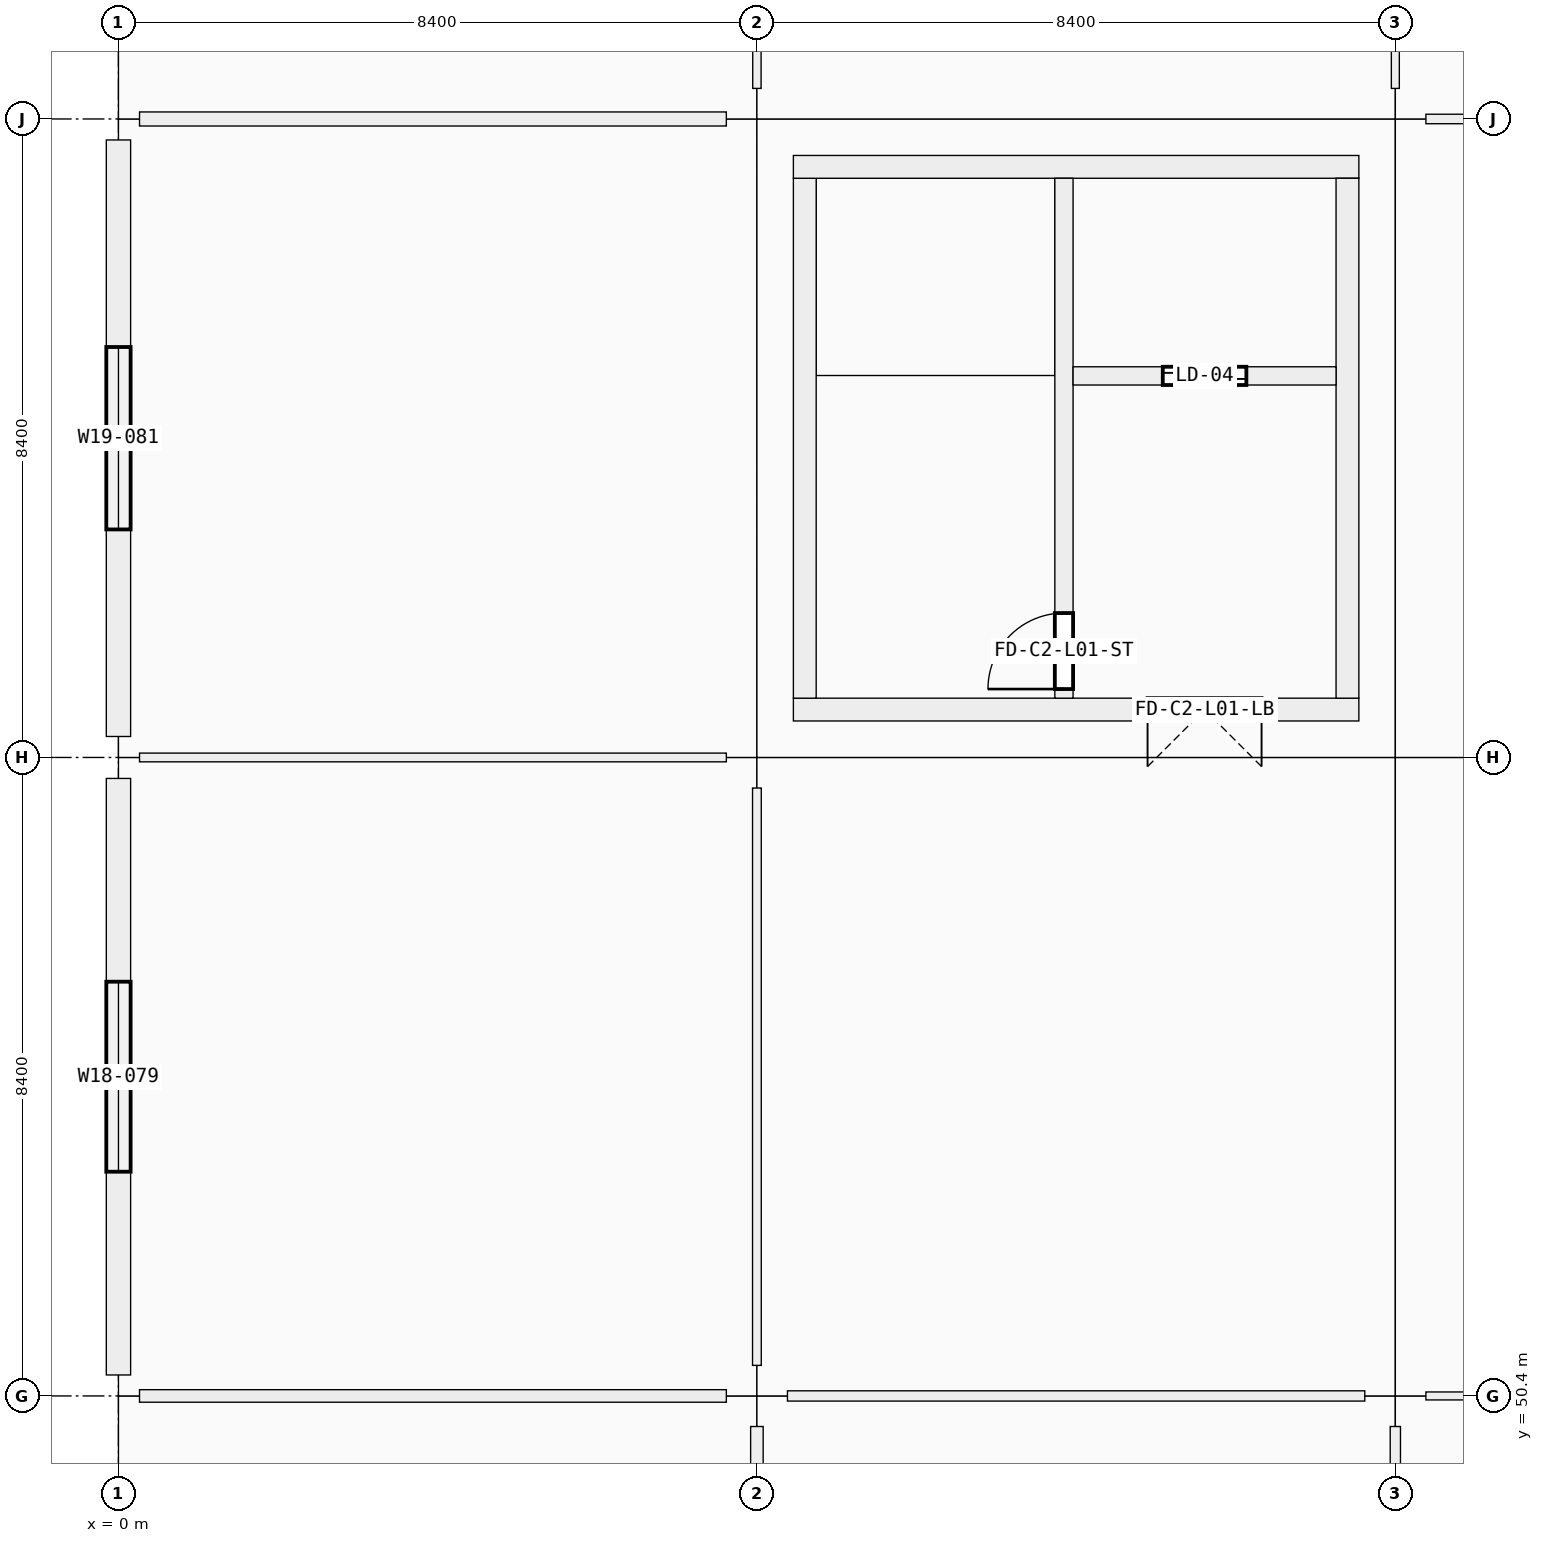
"""IFC4 building model, lengths in metres.
Left out: names, types, materials, properties, quantities, classifications, styles, units other than length and angle.
Written with IfcOpenShell. Run it as: python <this file> out.ifc"""

import sys

from ifc_helpers import new_model, si_unit, direction, frame, frame_2d, origin, origin_2d, place, context, subcontext, project, spatial, rectangle, extrude, element, fill, save


model = new_model("IFC4")
c1 = context("Model", 3, precision=1e-05, world=origin(), true_north=direction((0.0, 1.0)))
c2 = subcontext(c1, "Body", "Model", "MODEL_VIEW")
j1 = project(units=[si_unit("LENGTHUNIT", "METRE"), si_unit("PLANEANGLEUNIT", "RADIAN")], contexts=[c1])
p1 = place(None, origin())
s1 = spatial("IfcSite", under=j1, at=p1, CompositionType="ELEMENT")
p2 = place(p1, origin())
s2 = spatial("IfcBuilding", under=s1, at=p2, CompositionType="ELEMENT")
p3 = place(p2, frame((0.0, 0.0, 5.76)))
s3 = spatial("IfcBuildingStorey", under=s2, at=p3, CompositionType="ELEMENT", Elevation=5.76)
for number, where, z_axis, x_axis in (
    (1, (0.0, 50.4, 0.0), (0.0, 0.0, 1.0), (1.0, 0.0, 0.0)),
    (2, (0.0, 58.8, 0.0), (0.0, 0.0, 1.0), (1.0, 0.0, 0.0)),
    (3, (0.0, 67.2, 0.0), (0.0, 0.0, 1.0), (1.0, 0.0, 0.0)),
):
    element("IfcColumn", number, at=place(p3, frame(where, z_axis=z_axis, x_axis=x_axis)), inside=s3, PredefinedType="COLUMN", context=c2, shape_type="SweptSolid", body=[
        extrude(rectangle(XDim=0.55, YDim=0.55, at=origin_2d()), origin(), (0.0, 0.0, 1.0), 4.2),
    ])
for number, where, z_axis, x_axis in (
    (4, (8.4, 50.4, 0.0), (0.0, 0.0, 1.0), (1.0, 0.0, 0.0)),
    (5, (8.4, 58.8, 0.0), (0.0, 0.0, 1.0), (1.0, 0.0, 0.0)),
    (6, (8.4, 67.2, 0.0), (0.0, 0.0, 1.0), (1.0, 0.0, 0.0)),
    (7, (16.8, 50.4, 0.0), (0.0, 0.0, 1.0), (1.0, 0.0, 0.0)),
    (8, (16.8, 58.8, 0.0), (0.0, 0.0, 1.0), (1.0, 0.0, 0.0)),
    (9, (16.8, 67.2, 0.0), (0.0, 0.0, 1.0), (1.0, 0.0, 0.0)),
):
    element("IfcColumn", number, at=place(p3, frame(where, z_axis=z_axis, x_axis=x_axis)), inside=s3, PredefinedType="COLUMN", context=c2, shape_type="SweptSolid", body=[
        extrude(rectangle(XDim=0.8, YDim=0.8, at=origin_2d()), origin(), (0.0, 0.0, 1.0), 4.5),
    ])
p4 = place(p3, frame((0.0, 50.676, 0.0), z_axis=(0.0, 0.0, 1.0), x_axis=(0.0, 1.0, 0.0)))
e10 = element("IfcWall", 10, at=p4, inside=s3, PredefinedType="SOLIDWALL", context=c2, shape_type="SweptSolid", body=[
    extrude(rectangle(XDim=7.848, YDim=0.32, at=frame_2d((3.924, 0.0))), origin(), (0.0, 0.0, 1.0), 3.4),
])
p5 = place(p4, frame((2.674, 0.0, 0.9)))
e11 = element("IfcOpeningElement", 11, at=p5, cuts=e10, PredefinedType="OPENING", context=c2, shape_type="SweptSolid", body=[
    extrude(rectangle(XDim=2.5, YDim=1.65, at=frame_2d((1.25, 0.825))), frame((0.0, 0.16, 0.0), z_axis=(0.0, -1.0, 0.0), x_axis=(1.0, 0.0, 0.0)), (0.0, 0.0, 1.0), 0.32),
])
p6 = place(p3, frame((0.0, 59.076, 0.0), z_axis=(0.0, 0.0, 1.0), x_axis=(0.0, 1.0, 0.0)))
e12 = element("IfcWall", 12, at=p6, inside=s3, PredefinedType="SOLIDWALL", context=c2, shape_type="SweptSolid", body=[
    extrude(rectangle(XDim=7.848, YDim=0.32, at=frame_2d((3.924, 0.0))), origin(), (0.0, 0.0, 1.0), 3.4),
])
p7 = place(p6, frame((2.724, 0.0, 0.9)))
e13 = element("IfcOpeningElement", 13, at=p7, cuts=e12, PredefinedType="OPENING", context=c2, shape_type="SweptSolid", body=[
    extrude(rectangle(XDim=2.4, YDim=2.25, at=frame_2d((1.2, 1.125))), frame((0.0, 0.16, 0.0), z_axis=(0.0, -1.0, 0.0), x_axis=(1.0, 0.0, 0.0)), (0.0, 0.0, 1.0), 0.32),
])
p8 = place(p3, frame((16.32, 59.43, 0.0), z_axis=(0.0, 0.0, 1.0), x_axis=(-1.0, 0.0, 0.0)))
e14 = element("IfcWall", 14, at=p8, inside=s3, PredefinedType="SHEAR", context=c2, shape_type="SweptSolid", body=[
    extrude(rectangle(XDim=7.44, YDim=0.3, at=frame_2d((3.72, 0.0))), origin(), (0.0, 0.0, 1.0), 4.5),
])
p9 = place(p8, frame((1.28, 0.0, 0.0)))
e15 = element("IfcOpeningElement", 15, at=p9, cuts=e14, PredefinedType="OPENING", context=c2, shape_type="SweptSolid", body=[
    extrude(rectangle(XDim=1.5, YDim=2.15, at=frame_2d((0.75, 1.075))), frame((0.0, 0.15, 0.0), z_axis=(0.0, -1.0, 0.0), x_axis=(1.0, 0.0, 0.0)), (0.0, 0.0, 1.0), 0.3),
])
p10 = place(p3, frame((9.03, 59.58, 0.0), z_axis=(0.0, 0.0, 1.0), x_axis=(0.0, 1.0, 0.0)))
e16 = element("IfcWall", 16, at=p10, inside=s3, PredefinedType="SHEAR", context=c2, shape_type="SweptSolid", body=[
    extrude(rectangle(XDim=6.84, YDim=0.3, at=frame_2d((3.42, 0.0))), origin(), (0.0, 0.0, 1.0), 4.5),
])
p11 = place(p3, frame((8.88, 66.57, 0.0), z_axis=(0.0, 0.0, 1.0), x_axis=(1.0, 0.0, 0.0)))
e17 = element("IfcWall", 17, at=p11, inside=s3, PredefinedType="SHEAR", context=c2, shape_type="SweptSolid", body=[
    extrude(rectangle(XDim=7.44, YDim=0.3, at=frame_2d((3.72, 0.0))), origin(), (0.0, 0.0, 1.0), 4.5),
])
p12 = place(p3, frame((16.17, 66.42, 0.0), z_axis=(0.0, 0.0, 1.0), x_axis=(0.0, -1.0, 0.0)))
e18 = element("IfcWall", 18, at=p12, inside=s3, PredefinedType="SHEAR", context=c2, shape_type="SweptSolid", body=[
    extrude(rectangle(XDim=6.84, YDim=0.3, at=frame_2d((3.42, 0.0))), origin(), (0.0, 0.0, 1.0), 4.5),
])
p13 = place(p3, frame((12.44, 59.58, 0.0), z_axis=(0.0, 0.0, 1.0), x_axis=(0.0, 1.0, 0.0)))
e19 = element("IfcWall", 19, at=p13, inside=s3, PredefinedType="SHEAR", context=c2, shape_type="SweptSolid", body=[
    extrude(rectangle(XDim=6.84, YDim=0.24, at=frame_2d((3.42, 0.0))), origin(), (0.0, 0.0, 1.0), 4.5),
])
p14 = place(p13, frame((0.12, 0.0, 0.0)))
e20 = element("IfcOpeningElement", 20, at=p14, cuts=e19, PredefinedType="OPENING", context=c2, shape_type="SweptSolid", body=[
    extrude(rectangle(XDim=1.0, YDim=2.15, at=frame_2d((0.5, 1.075))), frame((0.0, 0.12, 0.0), z_axis=(0.0, -1.0, 0.0), x_axis=(1.0, 0.0, 0.0)), (0.0, 0.0, 1.0), 0.24),
])
p15 = place(p3, frame((12.56, 63.82, 0.0), z_axis=(0.0, 0.0, 1.0), x_axis=(1.0, 0.0, 0.0)))
e21 = element("IfcWall", 21, at=p15, inside=s3, PredefinedType="SHEAR", context=c2, shape_type="SweptSolid", body=[
    extrude(rectangle(XDim=3.46, YDim=0.24, at=frame_2d((1.73, 0.0))), origin(), (0.0, 0.0, 1.0), 4.5),
])
p16 = place(p15, frame((1.18, 0.0, 0.0)))
e22 = element("IfcOpeningElement", 22, at=p16, cuts=e21, PredefinedType="OPENING", context=c2, shape_type="SweptSolid", body=[
    extrude(rectangle(XDim=1.1, YDim=2.15, at=frame_2d((0.55, 1.075))), frame((0.0, 0.12, 0.0), z_axis=(0.0, -1.0, 0.0), x_axis=(1.0, 0.0, 0.0)), (0.0, 0.0, 1.0), 0.24),
])
p17 = place(p3, frame((0.277, 50.4, 0.0), z_axis=(0.0, 0.0, 1.0), x_axis=(1.0, 0.0, 0.0)))
e23 = element("IfcWall", 23, at=p17, inside=s3, PredefinedType="PARTITIONING", context=c2, shape_type="SweptSolid", body=[
    extrude(rectangle(XDim=7.721, YDim=0.165, at=frame_2d((3.86, 0.0))), origin(), (0.0, 0.0, 1.0), 2.4),
])
p18 = place(p17, frame((3.376, 0.0, 0.0)))
e24 = element("IfcOpeningElement", 24, at=p18, cuts=e23, PredefinedType="OPENING", context=c2, shape_type="SweptSolid", body=[
    extrude(rectangle(XDim=0.97, YDim=2.12, at=frame_2d((0.485, 1.06))), frame((0.0, 0.083, 0.0), z_axis=(0.0, -1.0, 0.0), x_axis=(1.0, 0.0, 0.0)), (0.0, 0.0, 1.0), 0.165),
])
p19 = place(p3, frame((0.277, 58.8, 0.0), z_axis=(0.0, 0.0, 1.0), x_axis=(1.0, 0.0, 0.0)))
e25 = element("IfcWall", 25, at=p19, inside=s3, PredefinedType="PARTITIONING", context=c2, shape_type="SweptSolid", body=[
    extrude(rectangle(XDim=7.721, YDim=0.115, at=frame_2d((3.86, 0.0))), origin(), (0.0, 0.0, 1.0), 2.4),
])
p20 = place(p19, frame((3.361, 0.0, 0.0)))
e26 = element("IfcOpeningElement", 26, at=p20, cuts=e25, PredefinedType="OPENING", context=c2, shape_type="SweptSolid", body=[
    extrude(rectangle(XDim=1.0, YDim=2.2, at=frame_2d((0.5, 1.1))), frame((0.0, 0.058, 0.0), z_axis=(0.0, -1.0, 0.0), x_axis=(1.0, 0.0, 0.0)), (0.0, 0.0, 1.0), 0.115),
])
p21 = place(p3, frame((0.277, 67.2, 0.0), z_axis=(0.0, 0.0, 1.0), x_axis=(1.0, 0.0, 0.0)))
e27 = element("IfcWall", 27, at=p21, inside=s3, PredefinedType="PARTITIONING", context=c2, shape_type="SweptSolid", body=[
    extrude(rectangle(XDim=7.721, YDim=0.185, at=frame_2d((3.86, 0.0))), origin(), (0.0, 0.0, 1.0), 2.4),
])
p22 = place(p21, frame((3.37, 0.0, 0.0)))
e28 = element("IfcOpeningElement", 28, at=p22, cuts=e27, PredefinedType="OPENING", context=c2, shape_type="SweptSolid", body=[
    extrude(rectangle(XDim=0.98, YDim=2.18, at=frame_2d((0.49, 1.09))), frame((0.0, 0.093, 0.0), z_axis=(0.0, -1.0, 0.0), x_axis=(1.0, 0.0, 0.0)), (0.0, 0.0, 1.0), 0.185),
])
p23 = place(p3, frame((8.802, 50.4, 0.0), z_axis=(0.0, 0.0, 1.0), x_axis=(1.0, 0.0, 0.0)))
e29 = element("IfcWall", 29, at=p23, inside=s3, PredefinedType="PARTITIONING", context=c2, shape_type="SweptSolid", body=[
    extrude(rectangle(XDim=7.596, YDim=0.135, at=frame_2d((3.798, 0.0))), origin(), (0.0, 0.0, 1.0), 2.4),
])
p24 = place(p23, frame((3.328, 0.0, 0.0)))
e30 = element("IfcOpeningElement", 30, at=p24, cuts=e29, PredefinedType="OPENING", context=c2, shape_type="SweptSolid", body=[
    extrude(rectangle(XDim=0.94, YDim=2.15, at=frame_2d((0.47, 1.075))), frame((0.0, 0.067, 0.0), z_axis=(0.0, -1.0, 0.0), x_axis=(1.0, 0.0, 0.0)), (0.0, 0.0, 1.0), 0.135),
])
p25 = place(p3, frame((17.202, 50.4, 0.0), z_axis=(0.0, 0.0, 1.0), x_axis=(1.0, 0.0, 0.0)))
e31 = element("IfcWall", 31, at=p25, inside=s3, PredefinedType="PARTITIONING", context=c2, shape_type="SweptSolid", body=[
    extrude(rectangle(XDim=7.596, YDim=0.105, at=frame_2d((3.798, 0.0))), origin(), (0.0, 0.0, 1.0), 2.4),
])
p26 = place(p25, frame((0.583, 0.0, 0.0)))
e32 = element("IfcOpeningElement", 32, at=p26, cuts=e31, PredefinedType="OPENING", context=c2, shape_type="SweptSolid", body=[
    extrude(rectangle(XDim=0.96, YDim=2.1, at=frame_2d((0.48, 1.05))), frame((0.0, 0.052, 0.0), z_axis=(0.0, -1.0, 0.0), x_axis=(1.0, 0.0, 0.0)), (0.0, 0.0, 1.0), 0.105),
])
p27 = place(p25, frame((4.523, 0.0, 0.0)))
e33 = element("IfcOpeningElement", 33, at=p27, cuts=e31, PredefinedType="OPENING", context=c2, shape_type="SweptSolid", body=[
    extrude(rectangle(XDim=0.92, YDim=2.1, at=frame_2d((0.46, 1.05))), frame((0.0, 0.052, 0.0), z_axis=(0.0, -1.0, 0.0), x_axis=(1.0, 0.0, 0.0)), (0.0, 0.0, 1.0), 0.105),
])
p28 = place(p3, frame((17.202, 67.2, 0.0), z_axis=(0.0, 0.0, 1.0), x_axis=(1.0, 0.0, 0.0)))
e34 = element("IfcWall", 34, at=p28, inside=s3, PredefinedType="PARTITIONING", context=c2, shape_type="SweptSolid", body=[
    extrude(rectangle(XDim=7.596, YDim=0.125, at=frame_2d((3.798, 0.0))), origin(), (0.0, 0.0, 1.0), 2.4),
])
p29 = place(p28, frame((3.273, 0.0, 0.0)))
e35 = element("IfcOpeningElement", 35, at=p29, cuts=e34, PredefinedType="OPENING", context=c2, shape_type="SweptSolid", body=[
    extrude(rectangle(XDim=1.05, YDim=2.12, at=frame_2d((0.525, 1.06))), frame((0.0, 0.062, 0.0), z_axis=(0.0, -1.0, 0.0), x_axis=(1.0, 0.0, 0.0)), (0.0, 0.0, 1.0), 0.125),
])
p30 = place(p3, frame((8.4, 42.402, 0.0), z_axis=(0.0, 0.0, 1.0), x_axis=(0.0, 1.0, 0.0)))
e36 = element("IfcWall", 36, at=p30, inside=s3, PredefinedType="PARTITIONING", context=c2, shape_type="SweptSolid", body=[
    extrude(rectangle(XDim=7.596, YDim=0.165, at=frame_2d((3.798, 0.0))), origin(), (0.0, 0.0, 1.0), 2.4),
])
p31 = place(p30, frame((3.318, 0.0, 0.0)))
e37 = element("IfcOpeningElement", 37, at=p31, cuts=e36, PredefinedType="OPENING", context=c2, shape_type="SweptSolid", body=[
    extrude(rectangle(XDim=0.96, YDim=2.18, at=frame_2d((0.48, 1.09))), frame((0.0, 0.083, 0.0), z_axis=(0.0, -1.0, 0.0), x_axis=(1.0, 0.0, 0.0)), (0.0, 0.0, 1.0), 0.165),
])
p32 = place(p3, frame((8.4, 50.802, 0.0), z_axis=(0.0, 0.0, 1.0), x_axis=(0.0, 1.0, 0.0)))
e38 = element("IfcWall", 38, at=p32, inside=s3, PredefinedType="PARTITIONING", context=c2, shape_type="SweptSolid", body=[
    extrude(rectangle(XDim=7.596, YDim=0.115, at=frame_2d((3.798, 0.0))), origin(), (0.0, 0.0, 1.0), 2.4),
])
p33 = place(p32, frame((3.333, 0.0, 0.0)))
e39 = element("IfcOpeningElement", 39, at=p33, cuts=e38, PredefinedType="OPENING", context=c2, shape_type="SweptSolid", body=[
    extrude(rectangle(XDim=0.93, YDim=2.12, at=frame_2d((0.465, 1.06))), frame((0.0, 0.058, 0.0), z_axis=(0.0, -1.0, 0.0), x_axis=(1.0, 0.0, 0.0)), (0.0, 0.0, 1.0), 0.115),
])
p34 = place(p3, frame((8.4, 67.602, 0.0), z_axis=(0.0, 0.0, 1.0), x_axis=(0.0, 1.0, 0.0)))
e40 = element("IfcWall", 40, at=p34, inside=s3, PredefinedType="MOVABLE", context=c2, shape_type="SweptSolid", body=[
    extrude(rectangle(XDim=7.596, YDim=0.11, at=frame_2d((3.798, 0.0))), origin(), (0.0, 0.0, 1.0), 2.4),
])
p35 = place(p34, frame((3.318, 0.0, 0.0)))
e41 = element("IfcOpeningElement", 41, at=p35, cuts=e40, PredefinedType="OPENING", context=c2, shape_type="SweptSolid", body=[
    extrude(rectangle(XDim=0.96, YDim=2.18, at=frame_2d((0.48, 1.09))), frame((0.0, 0.055, 0.0), z_axis=(0.0, -1.0, 0.0), x_axis=(1.0, 0.0, 0.0)), (0.0, 0.0, 1.0), 0.11),
])
p36 = place(p3, frame((16.8, 42.402, 0.0), z_axis=(0.0, 0.0, 1.0), x_axis=(0.0, 1.0, 0.0)))
e42 = element("IfcWall", 42, at=p36, inside=s3, PredefinedType="PARTITIONING", context=c2, shape_type="SweptSolid", body=[
    extrude(rectangle(XDim=7.596, YDim=0.135, at=frame_2d((3.798, 0.0))), origin(), (0.0, 0.0, 1.0), 2.4),
])
p37 = place(p3, frame((16.8, 67.602, 0.0), z_axis=(0.0, 0.0, 1.0), x_axis=(0.0, 1.0, 0.0)))
e43 = element("IfcWall", 43, at=p37, inside=s3, PredefinedType="PARTITIONING", context=c2, shape_type="SweptSolid", body=[
    extrude(rectangle(XDim=7.596, YDim=0.105, at=frame_2d((3.798, 0.0))), origin(), (0.0, 0.0, 1.0), 2.4),
])
p38 = place(p37, frame((3.313, 0.0, 0.0)))
e44 = element("IfcOpeningElement", 44, at=p38, cuts=e43, PredefinedType="OPENING", context=c2, shape_type="SweptSolid", body=[
    extrude(rectangle(XDim=0.97, YDim=2.12, at=frame_2d((0.485, 1.06))), frame((0.0, 0.052, 0.0), z_axis=(0.0, -1.0, 0.0), x_axis=(1.0, 0.0, 0.0)), (0.0, 0.0, 1.0), 0.105),
])
p39 = place(p5, origin())
e45 = element("IfcWindow", 45, at=p39, inside=s3, PartitioningType="SINGLE_PANEL", PredefinedType="WINDOW", context=c2, shape_type="SweptSolid", body=[
    extrude(rectangle(XDim=2.5, YDim=1.65, at=frame_2d((1.25, 0.825))), frame((0.0, 0.03, 0.0), z_axis=(0.0, -1.0, 0.0), x_axis=(1.0, 0.0, 0.0)), (0.0, 0.0, 1.0), 0.06),
])
fill(e11, e45)
p40 = place(p7, origin())
e46 = element("IfcWindow", 46, at=p40, inside=s3, PartitioningType="SINGLE_PANEL", PredefinedType="WINDOW", context=c2, shape_type="SweptSolid", body=[
    extrude(rectangle(XDim=2.4, YDim=2.25, at=frame_2d((1.2, 1.125))), frame((0.0, 0.03, 0.0), z_axis=(0.0, -1.0, 0.0), x_axis=(1.0, 0.0, 0.0)), (0.0, 0.0, 1.0), 0.06),
])
fill(e13, e46)
p41 = place(p14, origin())
e47 = element("IfcDoor", 47, at=p41, inside=s3, OperationType="SINGLE_SWING_LEFT", PredefinedType="DOOR", context=c2, shape_type="SweptSolid", body=[
    extrude(rectangle(XDim=1.0, YDim=2.15, at=frame_2d((0.5, 1.075))), frame((0.0, 0.025, 0.0), z_axis=(0.0, -1.0, 0.0), x_axis=(1.0, 0.0, 0.0)), (0.0, 0.0, 1.0), 0.05),
])
fill(e20, e47)
p42 = place(p9, origin())
e48 = element("IfcDoor", 48, at=p42, inside=s3, OperationType="DOUBLE_DOOR_SINGLE_SWING", PredefinedType="DOOR", context=c2, shape_type="SweptSolid", body=[
    extrude(rectangle(XDim=1.5, YDim=2.15, at=frame_2d((0.75, 1.075))), frame((0.0, 0.025, 0.0), z_axis=(0.0, -1.0, 0.0), x_axis=(1.0, 0.0, 0.0)), (0.0, 0.0, 1.0), 0.05),
])
fill(e15, e48)
p43 = place(p16, origin())
e49 = element("IfcDoor", 49, at=p43, inside=s3, OperationType="DOUBLE_DOOR_SLIDING", PredefinedType="DOOR", context=c2, shape_type="SweptSolid", body=[
    extrude(rectangle(XDim=1.1, YDim=2.15, at=frame_2d((0.55, 1.075))), frame((0.0, 0.025, 0.0), z_axis=(0.0, -1.0, 0.0), x_axis=(1.0, 0.0, 0.0)), (0.0, 0.0, 1.0), 0.05),
])
fill(e22, e49)
p44 = place(p24, origin())
e50 = element("IfcDoor", 50, at=p44, inside=s3, OperationType="SINGLE_SWING_LEFT", PredefinedType="DOOR", context=c2, shape_type="SweptSolid", body=[
    extrude(rectangle(XDim=0.94, YDim=2.15, at=frame_2d((0.47, 1.075))), frame((0.0, 0.025, 0.0), z_axis=(0.0, -1.0, 0.0), x_axis=(1.0, 0.0, 0.0)), (0.0, 0.0, 1.0), 0.05),
])
fill(e30, e50)
p45 = place(p33, origin())
e51 = element("IfcDoor", 51, at=p45, inside=s3, OperationType="SINGLE_SWING_LEFT", PredefinedType="DOOR", context=c2, shape_type="SweptSolid", body=[
    extrude(rectangle(XDim=0.93, YDim=2.12, at=frame_2d((0.465, 1.06))), frame((0.0, 0.025, 0.0), z_axis=(0.0, -1.0, 0.0), x_axis=(1.0, 0.0, 0.0)), (0.0, 0.0, 1.0), 0.05),
])
fill(e39, e51)
p46 = place(p20, origin())
e52 = element("IfcDoor", 52, at=p46, inside=s3, OperationType="SINGLE_SWING_LEFT", PredefinedType="DOOR", context=c2, shape_type="SweptSolid", body=[
    extrude(rectangle(XDim=1.0, YDim=2.2, at=frame_2d((0.5, 1.1))), frame((0.0, 0.025, 0.0), z_axis=(0.0, -1.0, 0.0), x_axis=(1.0, 0.0, 0.0)), (0.0, 0.0, 1.0), 0.05),
])
fill(e26, e52)
p47 = place(p22, origin())
e53 = element("IfcDoor", 53, at=p47, inside=s3, OperationType="SINGLE_SWING_RIGHT", PredefinedType="DOOR", context=c2, shape_type="SweptSolid", body=[
    extrude(rectangle(XDim=0.98, YDim=2.18, at=frame_2d((0.49, 1.09))), frame((0.0, 0.025, 0.0), z_axis=(0.0, -1.0, 0.0), x_axis=(1.0, 0.0, 0.0)), (0.0, 0.0, 1.0), 0.05),
])
fill(e28, e53)
p48 = place(p18, origin())
e54 = element("IfcDoor", 54, at=p48, inside=s3, OperationType="SINGLE_SWING_LEFT", PredefinedType="DOOR", context=c2, shape_type="SweptSolid", body=[
    extrude(rectangle(XDim=0.97, YDim=2.12, at=frame_2d((0.485, 1.06))), frame((0.0, 0.025, 0.0), z_axis=(0.0, -1.0, 0.0), x_axis=(1.0, 0.0, 0.0)), (0.0, 0.0, 1.0), 0.05),
])
fill(e24, e54)
save(model, sys.argv[1])
